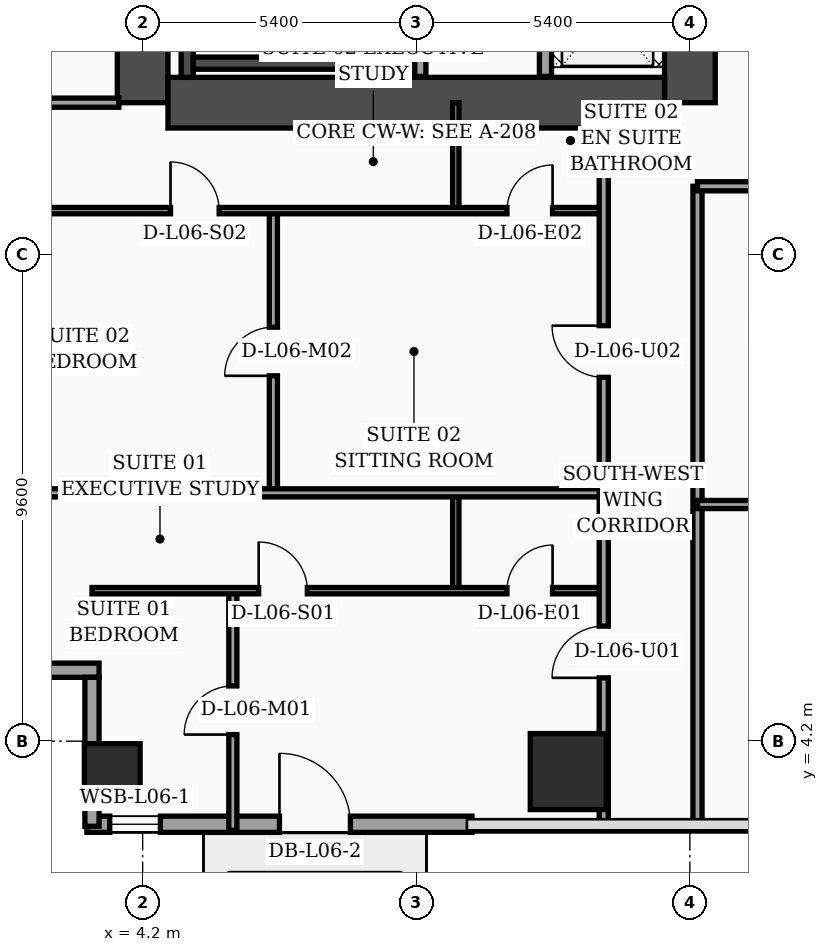
"""IFC4 building model, lengths in metres.
Left out: names, types, materials, properties, quantities, classifications, styles, units other than length and angle.
Written with IfcOpenShell. Run it as: python <this file> out.ifc"""

import sys

from ifc_helpers import new_model, si_unit, direction, frame, frame_2d, origin, origin_2d, place, context, subcontext, project, spatial, rectangle, hollow_rectangle, extrude, element, fill, save


model = new_model("IFC4")
c1 = context("Model", 3, precision=1e-05, world=origin(), true_north=direction((0.0, 1.0)))
c2 = subcontext(c1, "Body", "Model", "MODEL_VIEW")
j1 = project(units=[si_unit("LENGTHUNIT", "METRE"), si_unit("PLANEANGLEUNIT", "RADIAN")], contexts=[c1])
p1 = place(None, origin())
s1 = spatial("IfcSite", under=j1, at=p1, CompositionType="ELEMENT")
p2 = place(p1, origin())
s2 = spatial("IfcBuilding", under=s1, at=p2, CompositionType="ELEMENT")
p3 = place(p2, frame((0.0, 0.0, 30.8)))
s3 = spatial("IfcBuildingStorey", under=s2, at=p3, CompositionType="ELEMENT", Elevation=30.8)
p4 = place(p3, frame((4.2, 16.8, 0.0), z_axis=(0.0, 0.0, 1.0), x_axis=(0.0, 1.0, 0.0)))
e1 = element("IfcWall", 1, at=p4, inside=s3, PredefinedType="SHEAR", context=c2, shape_type="SweptSolid", body=[
    extrude(rectangle(XDim=21.6, YDim=1.0, at=frame_2d((10.8, 0.0))), origin(), (0.0, 0.0, 1.0), 3.56),
])
p5 = place(p3, frame((15.0, 16.8, 0.0), z_axis=(0.0, 0.0, 1.0), x_axis=(0.0, 1.0, 0.0)))
e2 = element("IfcWall", 2, at=p5, inside=s3, PredefinedType="SHEAR", context=c2, shape_type="SweptSolid", body=[
    extrude(rectangle(XDim=21.6, YDim=1.0, at=frame_2d((10.8, 0.0))), origin(), (0.0, 0.0, 1.0), 3.56),
])
p6 = place(p5, frame((8.65, 0.0, 0.0)))
e3 = element("IfcOpeningElement", 3, at=p6, cuts=e2, PredefinedType="OPENING", context=c2, shape_type="SweptSolid", body=[
    extrude(rectangle(XDim=1.1, YDim=2.2, at=frame_2d((0.55, 1.1))), frame((0.0, 0.51, 0.0), z_axis=(0.0, -1.0, 0.0), x_axis=(1.0, 0.0, 0.0)), (0.0, 0.0, 1.0), 1.02),
])
p7 = place(p5, frame((1.25, 0.0, 0.0)))
e4 = element("IfcOpeningElement", 4, at=p7, cuts=e2, PredefinedType="OPENING", context=c2, shape_type="SweptSolid", body=[
    extrude(rectangle(XDim=1.1, YDim=2.2, at=frame_2d((0.55, 1.1))), frame((0.0, 0.51, 0.0), z_axis=(0.0, -1.0, 0.0), x_axis=(1.0, 0.0, 0.0)), (0.0, 0.0, 1.0), 1.02),
])
p8 = place(p5, frame((3.8, 0.0, 0.0)))
e5 = element("IfcOpeningElement", 5, at=p8, cuts=e2, PredefinedType="OPENING", context=c2, shape_type="SweptSolid", body=[
    extrude(rectangle(XDim=1.1, YDim=2.2, at=frame_2d((0.55, 1.1))), frame((0.0, 0.51, 0.0), z_axis=(0.0, -1.0, 0.0), x_axis=(1.0, 0.0, 0.0)), (0.0, 0.0, 1.0), 1.02),
])
p9 = place(p5, frame((6.35, 0.0, 0.0)))
e6 = element("IfcOpeningElement", 6, at=p9, cuts=e2, PredefinedType="OPENING", context=c2, shape_type="SweptSolid", body=[
    extrude(rectangle(XDim=1.1, YDim=2.2, at=frame_2d((0.55, 1.1))), frame((0.0, 0.51, 0.0), z_axis=(0.0, -1.0, 0.0), x_axis=(1.0, 0.0, 0.0)), (0.0, 0.0, 1.0), 1.02),
])
p10 = place(p3, frame((4.7, 16.8, 0.0), z_axis=(0.0, 0.0, 1.0), x_axis=(1.0, 0.0, 0.0)))
e7 = element("IfcWall", 7, at=p10, inside=s3, PredefinedType="SHEAR", context=c2, shape_type="SweptSolid", body=[
    extrude(rectangle(XDim=9.8, YDim=1.0, at=frame_2d((4.9, 0.0))), origin(), (0.0, 0.0, 1.0), 3.56),
])
p11 = place(p3, frame((5.08, 17.3, 0.0), z_axis=(0.0, 0.0, 1.0), x_axis=(0.0, 1.0, 0.0)))
e8 = element("IfcWall", 8, at=p11, inside=s3, PredefinedType="SOLIDWALL", context=c2, shape_type="SweptSolid", body=[
    extrude(rectangle(XDim=9.49, YDim=0.24, at=frame_2d((4.745, 0.0))), origin(), (0.0, 0.0, 1.0), 3.56),
])
p12 = place(p3, frame((8.42, 17.3, 0.0), z_axis=(0.0, 0.0, 1.0), x_axis=(0.0, 1.0, 0.0)))
e9 = element("IfcWall", 9, at=p12, inside=s3, PredefinedType="SOLIDWALL", context=c2, shape_type="SweptSolid", body=[
    extrude(rectangle(XDim=9.49, YDim=0.24, at=frame_2d((4.745, 0.0))), origin(), (0.0, 0.0, 1.0), 3.56),
])
p13 = place(p12, frame((0.35, 0.0, 0.0)))
e10 = element("IfcOpeningElement", 10, at=p13, cuts=e9, PredefinedType="OPENING", context=c2, shape_type="SweptSolid", body=[
    extrude(rectangle(XDim=1.15, YDim=2.2, at=frame_2d((0.575, 1.1))), frame((0.0, 0.13, 0.0), z_axis=(0.0, -1.0, 0.0), x_axis=(1.0, 0.0, 0.0)), (0.0, 0.0, 1.0), 0.26),
])
p14 = place(p3, frame((5.2, 17.58, 0.0), z_axis=(0.0, 0.0, 1.0), x_axis=(1.0, 0.0, 0.0)))
e11 = element("IfcWall", 11, at=p14, inside=s3, PredefinedType="SOLIDWALL", context=c2, shape_type="SweptSolid", body=[
    extrude(rectangle(XDim=3.1, YDim=0.24, at=frame_2d((1.55, 0.0))), origin(), (0.0, 0.0, 1.0), 3.56),
])
p15 = place(p3, frame((3.6, 3.6, 0.0), z_axis=(0.0, 0.0, 1.0), x_axis=(1.0, 0.0, 0.0)))
e12 = element("IfcColumn", 12, at=p15, inside=s3, PredefinedType="COLUMN", context=c2, shape_type="SweptSolid", body=[
    extrude(hollow_rectangle(XDim=1.1, YDim=1.1, WallThickness=0.045, at=origin_2d()), origin(), (0.0, 0.0, 1.0), 3.56),
])
p16 = place(p3, frame((12.6, 3.6, 0.0), z_axis=(0.0, 0.0, 1.0), x_axis=(1.0, 0.0, 0.0)))
e13 = element("IfcColumn", 13, at=p16, inside=s3, PredefinedType="COLUMN", context=c2, shape_type="SweptSolid", body=[
    extrude(rectangle(XDim=1.5, YDim=1.5, at=origin_2d()), origin(), (0.0, 0.0, 1.0), 3.56),
])
p17 = place(p3, frame((3.1, 2.56, 0.0), z_axis=(0.0, 0.0, 1.0), x_axis=(1.0, 0.0, 0.0)))
e14 = element("IfcWall", 14, at=p17, inside=s3, PredefinedType="SOLIDWALL", context=c2, shape_type="SweptSolid", body=[
    extrude(rectangle(XDim=7.6, YDim=0.32, at=frame_2d((3.8, 0.0))), origin(), (0.0, 0.0, 1.0), 3.56),
])
p18 = place(p17, frame((0.45, 0.0, 0.75)))
e15 = element("IfcOpeningElement", 15, at=p18, cuts=e14, PredefinedType="OPENING", context=c2, shape_type="SweptSolid", body=[
    extrude(rectangle(XDim=1.0, YDim=1.6, at=frame_2d((0.5, 0.8))), frame((0.0, 0.17, 0.0), z_axis=(0.0, -1.0, 0.0), x_axis=(1.0, 0.0, 0.0)), (0.0, 0.0, 1.0), 0.34),
])
p19 = place(p17, frame((3.8, 0.0, 0.0)))
e16 = element("IfcOpeningElement", 16, at=p19, cuts=e14, PredefinedType="OPENING", context=c2, shape_type="SweptSolid", body=[
    extrude(rectangle(XDim=1.4, YDim=2.25, at=frame_2d((0.7, 1.125))), frame((0.0, 0.17, 0.0), z_axis=(0.0, -1.0, 0.0), x_axis=(1.0, 0.0, 0.0)), (0.0, 0.0, 1.0), 0.34),
])
p20 = place(p3, frame((0.12, 5.6, 0.0), z_axis=(0.0, 0.0, 1.0), x_axis=(1.0, 0.0, 0.0)))
e17 = element("IfcWall", 17, at=p20, inside=s3, PredefinedType="SOLIDWALL", context=c2, shape_type="SweptSolid", body=[
    extrude(rectangle(XDim=3.22, YDim=0.28, at=frame_2d((1.61, 0.0))), origin(), (0.0, 0.0, 1.0), 2.84),
])
p21 = place(p3, frame((3.2, 5.46, 0.0), z_axis=(0.0, 0.0, 1.0), x_axis=(0.0, -1.0, 0.0)))
e18 = element("IfcWall", 18, at=p21, inside=s3, PredefinedType="SOLIDWALL", context=c2, shape_type="SweptSolid", body=[
    extrude(rectangle(XDim=2.94, YDim=0.28, at=frame_2d((1.47, 0.0))), origin(), (0.0, 0.0, 1.0), 2.84),
])
p22 = place(p3, frame((9.68, 17.32, 0.0), z_axis=(0.0, 0.0, 1.0), x_axis=(0.0, 1.0, 0.0)))
e19 = element("IfcWall", 19, at=p22, inside=s3, PredefinedType="SOLIDWALL", context=c2, shape_type="SweptSolid", body=[
    extrude(rectangle(XDim=7.68, YDim=0.22, at=frame_2d((3.84, 0.0))), origin(), (0.0, 0.0, 1.0), 3.56),
])
p23 = place(p3, frame((12.15, 17.32, 0.0), z_axis=(0.0, 0.0, 1.0), x_axis=(0.0, 1.0, 0.0)))
e20 = element("IfcWall", 20, at=p23, inside=s3, PredefinedType="SOLIDWALL", context=c2, shape_type="SweptSolid", body=[
    extrude(rectangle(XDim=7.65, YDim=0.24, at=frame_2d((3.825, 0.0))), origin(), (0.0, 0.0, 1.0), 3.56),
])
p24 = place(p3, frame((0.08, 16.8, 0.0), z_axis=(0.0, 0.0, 1.0), x_axis=(1.0, 0.0, 0.0)))
e21 = element("IfcWall", 21, at=p24, inside=s3, PredefinedType="PARTITIONING", context=c2, shape_type="SweptSolid", body=[
    extrude(rectangle(XDim=3.65, YDim=0.18, at=frame_2d((1.825, 0.0))), origin(), (0.0, 0.0, 1.0), 2.84),
])
p25 = place(p3, frame((10.38, 7.17, 0.0), z_axis=(0.0, 0.0, 1.0), x_axis=(0.0, 1.0, 0.0)))
e22 = element("IfcWall", 22, at=p25, inside=s3, PredefinedType="PARTITIONING", context=c2, shape_type="SweptSolid", body=[
    extrude(rectangle(XDim=1.93, YDim=0.125, at=frame_2d((0.965, 0.0))), origin(), (0.0, 0.0, 1.0), 3.09),
])
p26 = place(p3, frame((5.98, 2.44, 0.0), z_axis=(0.0, 0.0, 1.0), x_axis=(0.0, 1.0, 0.0)))
e23 = element("IfcWall", 23, at=p26, inside=s3, PredefinedType="PARTITIONING", context=c2, shape_type="SweptSolid", body=[
    extrude(rectangle(XDim=4.73, YDim=0.16, at=frame_2d((2.365, 0.0))), origin(), (0.0, 0.0, 1.0), 3.04),
])
p27 = place(p26, frame((1.89, 0.0, 0.0)))
e24 = element("IfcOpeningElement", 24, at=p27, cuts=e23, PredefinedType="OPENING", context=c2, shape_type="SweptSolid", body=[
    extrude(rectangle(XDim=0.96, YDim=2.2, at=frame_2d((0.48, 1.1))), frame((0.0, 0.09, 0.0), z_axis=(0.0, -1.0, 0.0), x_axis=(1.0, 0.0, 0.0)), (0.0, 0.0, 1.0), 0.18),
])
p28 = place(p3, frame((3.2, 7.17, 0.0), z_axis=(0.0, 0.0, 1.0), x_axis=(1.0, 0.0, 0.0)))
e25 = element("IfcWall", 25, at=p28, inside=s3, PredefinedType="PARTITIONING", context=c2, shape_type="SweptSolid", body=[
    extrude(rectangle(XDim=10.1, YDim=0.125, at=frame_2d((5.05, 0.0))), origin(), (0.0, 0.0, 1.0), 2.84),
])
p29 = place(p28, frame((3.29, 0.0, 0.0)))
e26 = element("IfcOpeningElement", 26, at=p29, cuts=e25, PredefinedType="OPENING", context=c2, shape_type="SweptSolid", body=[
    extrude(rectangle(XDim=0.96, YDim=2.2, at=frame_2d((0.48, 1.1))), frame((0.0, 0.073, 0.0), z_axis=(0.0, -1.0, 0.0), x_axis=(1.0, 0.0, 0.0)), (0.0, 0.0, 1.0), 0.145),
])
p30 = place(p28, frame((8.19, 0.0, 0.0)))
e27 = element("IfcOpeningElement", 27, at=p30, cuts=e25, PredefinedType="OPENING", context=c2, shape_type="SweptSolid", body=[
    extrude(rectangle(XDim=0.9, YDim=2.15, at=frame_2d((0.45, 1.075))), frame((0.0, 0.073, 0.0), z_axis=(0.0, -1.0, 0.0), x_axis=(1.0, 0.0, 0.0)), (0.0, 0.0, 1.0), 0.145),
])
p31 = place(p3, frame((10.38, 14.67, 0.0), z_axis=(0.0, 0.0, 1.0), x_axis=(0.0, 1.0, 0.0)))
e28 = element("IfcWall", 28, at=p31, inside=s3, PredefinedType="PARTITIONING", context=c2, shape_type="SweptSolid", body=[
    extrude(rectangle(XDim=2.13, YDim=0.125, at=frame_2d((1.065, 0.0))), origin(), (0.0, 0.0, 1.0), 3.56),
])
p32 = place(p3, frame((6.78, 9.1, 0.0), z_axis=(0.0, 0.0, 1.0), x_axis=(0.0, 1.0, 0.0)))
e29 = element("IfcWall", 29, at=p32, inside=s3, PredefinedType="PARTITIONING", context=c2, shape_type="SweptSolid", body=[
    extrude(rectangle(XDim=5.57, YDim=0.16, at=frame_2d((2.785, 0.0))), origin(), (0.0, 0.0, 1.0), 3.14),
])
p33 = place(p32, frame((2.31, 0.0, 0.0)))
e30 = element("IfcOpeningElement", 30, at=p33, cuts=e29, PredefinedType="OPENING", context=c2, shape_type="SweptSolid", body=[
    extrude(rectangle(XDim=0.96, YDim=2.2, at=frame_2d((0.48, 1.1))), frame((0.0, 0.09, 0.0), z_axis=(0.0, -1.0, 0.0), x_axis=(1.0, 0.0, 0.0)), (0.0, 0.0, 1.0), 0.18),
])
p34 = place(p3, frame((0.08, 14.67, 0.0), z_axis=(0.0, 0.0, 1.0), x_axis=(1.0, 0.0, 0.0)))
e31 = element("IfcWall", 31, at=p34, inside=s3, PredefinedType="PARTITIONING", context=c2, shape_type="SweptSolid", body=[
    extrude(rectangle(XDim=13.22, YDim=0.125, at=frame_2d((6.61, 0.0))), origin(), (0.0, 0.0, 1.0), 2.84),
])
p35 = place(p34, frame((4.67, 0.0, 0.0)))
e32 = element("IfcOpeningElement", 32, at=p35, cuts=e31, PredefinedType="OPENING", context=c2, shape_type="SweptSolid", body=[
    extrude(rectangle(XDim=0.96, YDim=2.2, at=frame_2d((0.48, 1.1))), frame((0.0, 0.073, 0.0), z_axis=(0.0, -1.0, 0.0), x_axis=(1.0, 0.0, 0.0)), (0.0, 0.0, 1.0), 0.145),
])
p36 = place(p34, frame((11.31, 0.0, 0.0)))
e33 = element("IfcOpeningElement", 33, at=p36, cuts=e31, PredefinedType="OPENING", context=c2, shape_type="SweptSolid", body=[
    extrude(rectangle(XDim=0.9, YDim=2.15, at=frame_2d((0.45, 1.075))), frame((0.0, 0.073, 0.0), z_axis=(0.0, -1.0, 0.0), x_axis=(1.0, 0.0, 0.0)), (0.0, 0.0, 1.0), 0.145),
])
p37 = place(p3, frame((0.08, 9.1, 0.0), z_axis=(0.0, 0.0, 1.0), x_axis=(1.0, 0.0, 0.0)))
e34 = element("IfcWall", 34, at=p37, inside=s3, PredefinedType="PARTITIONING", context=c2, shape_type="SweptSolid", body=[
    extrude(rectangle(XDim=13.22, YDim=0.16, at=frame_2d((6.61, 0.0))), origin(), (0.0, 0.0, 1.0), 2.84),
])
p38 = place(p3, frame((13.3, 2.44, 0.0), z_axis=(0.0, 0.0, 1.0), x_axis=(0.0, 1.0, 0.0)))
e35 = element("IfcWall", 35, at=p38, inside=s3, PredefinedType="PARTITIONING", context=c2, shape_type="SweptSolid", body=[
    extrude(rectangle(XDim=14.36, YDim=0.18, at=frame_2d((7.18, 0.0))), origin(), (0.0, 0.0, 1.0), 3.04),
])
p39 = place(p38, frame((3.01, 0.0, 0.0)))
e36 = element("IfcOpeningElement", 36, at=p39, cuts=e35, PredefinedType="OPENING", context=c2, shape_type="SweptSolid", body=[
    extrude(rectangle(XDim=1.02, YDim=2.2, at=frame_2d((0.51, 1.1))), frame((0.0, 0.1, 0.0), z_axis=(0.0, -1.0, 0.0), x_axis=(1.0, 0.0, 0.0)), (0.0, 0.0, 1.0), 0.2),
])
p40 = place(p38, frame((8.94, 0.0, 0.0)))
e37 = element("IfcOpeningElement", 37, at=p40, cuts=e35, PredefinedType="OPENING", context=c2, shape_type="SweptSolid", body=[
    extrude(rectangle(XDim=1.02, YDim=2.2, at=frame_2d((0.51, 1.1))), frame((0.0, 0.1, 0.0), z_axis=(0.0, -1.0, 0.0), x_axis=(1.0, 0.0, 0.0)), (0.0, 0.0, 1.0), 0.2),
])
p41 = place(p3, frame((15.15, 2.44, 0.0), z_axis=(0.0, 0.0, 1.0), x_axis=(0.0, 1.0, 0.0)))
e38 = element("IfcWall", 38, at=p41, inside=s3, PredefinedType="PARTITIONING", context=c2, shape_type="SweptSolid", body=[
    extrude(rectangle(XDim=12.71, YDim=0.18, at=frame_2d((6.355, 0.0))), origin(), (0.0, 0.0, 1.0), 3.04),
])
p42 = place(p3, frame((15.15, 8.87, 0.0), z_axis=(0.0, 0.0, 1.0), x_axis=(1.0, 0.0, 0.0)))
e39 = element("IfcWall", 39, at=p42, inside=s3, PredefinedType="PARTITIONING", context=c2, shape_type="SweptSolid", body=[
    extrude(rectangle(XDim=4.45, YDim=0.16, at=frame_2d((2.225, 0.0))), origin(), (0.0, 0.0, 1.0), 3.56),
])
p43 = place(p42, frame((1.75, 0.0, 0.0)))
e40 = element("IfcOpeningElement", 40, at=p43, cuts=e39, PredefinedType="OPENING", context=c2, shape_type="SweptSolid", body=[
    extrude(rectangle(XDim=0.96, YDim=2.2, at=frame_2d((0.48, 1.1))), frame((0.0, 0.09, 0.0), z_axis=(0.0, -1.0, 0.0), x_axis=(1.0, 0.0, 0.0)), (0.0, 0.0, 1.0), 0.18),
])
p44 = place(p3, frame((15.15, 15.15, 0.0), z_axis=(0.0, 0.0, 1.0), x_axis=(1.0, 0.0, 0.0)))
e41 = element("IfcWall", 41, at=p44, inside=s3, PredefinedType="PARTITIONING", context=c2, shape_type="SweptSolid", body=[
    extrude(rectangle(XDim=6.45, YDim=0.18, at=frame_2d((3.225, 0.0))), origin(), (0.0, 0.0, 1.0), 2.34),
])
p45 = place(p44, frame((1.74, 0.0, 0.0)))
e42 = element("IfcOpeningElement", 42, at=p45, cuts=e41, PredefinedType="OPENING", context=c2, shape_type="SweptSolid", body=[
    extrude(rectangle(XDim=1.02, YDim=2.2, at=frame_2d((0.51, 1.1))), frame((0.0, 0.1, 0.0), z_axis=(0.0, -1.0, 0.0), x_axis=(1.0, 0.0, 0.0)), (0.0, 0.0, 1.0), 0.2),
])
p46 = place(p18, origin())
e43 = element("IfcWindow", 43, at=p46, inside=s3, PartitioningType="SINGLE_PANEL", PredefinedType="WINDOW", context=c2, shape_type="SweptSolid", body=[
    extrude(rectangle(XDim=1.0, YDim=1.6, at=frame_2d((0.5, 0.8))), frame((0.0, 0.03, 0.0), z_axis=(0.0, -1.0, 0.0), x_axis=(1.0, 0.0, 0.0)), (0.0, 0.0, 1.0), 0.06),
])
fill(e15, e43)
p47 = place(p19, origin())
e44 = element("IfcDoor", 44, at=p47, inside=s3, OperationType="SINGLE_SWING_LEFT", PredefinedType="DOOR", context=c2, shape_type="SweptSolid", body=[
    extrude(rectangle(XDim=1.4, YDim=2.25, at=frame_2d((0.7, 1.125))), frame((0.0, 0.025, 0.0), z_axis=(0.0, -1.0, 0.0), x_axis=(1.0, 0.0, 0.0)), (0.0, 0.0, 1.0), 0.05),
])
fill(e16, e44)
p48 = place(p27, origin())
e45 = element("IfcDoor", 45, at=p48, inside=s3, OperationType="SINGLE_SWING_LEFT", PredefinedType="DOOR", context=c2, shape_type="SweptSolid", body=[
    extrude(rectangle(XDim=0.96, YDim=2.2, at=frame_2d((0.48, 1.1))), frame((0.0, 0.025, 0.0), z_axis=(0.0, -1.0, 0.0), x_axis=(1.0, 0.0, 0.0)), (0.0, 0.0, 1.0), 0.05),
])
fill(e24, e45)
p49 = place(p29, origin())
e46 = element("IfcDoor", 46, at=p49, inside=s3, OperationType="SINGLE_SWING_LEFT", PredefinedType="DOOR", context=c2, shape_type="SweptSolid", body=[
    extrude(rectangle(XDim=0.96, YDim=2.2, at=frame_2d((0.48, 1.1))), frame((0.0, 0.025, 0.0), z_axis=(0.0, -1.0, 0.0), x_axis=(1.0, 0.0, 0.0)), (0.0, 0.0, 1.0), 0.05),
])
fill(e26, e46)
p50 = place(p30, origin())
e47 = element("IfcDoor", 47, at=p50, inside=s3, OperationType="SINGLE_SWING_RIGHT", PredefinedType="DOOR", context=c2, shape_type="SweptSolid", body=[
    extrude(rectangle(XDim=0.9, YDim=2.15, at=frame_2d((0.45, 1.075))), frame((0.0, 0.025, 0.0), z_axis=(0.0, -1.0, 0.0), x_axis=(1.0, 0.0, 0.0)), (0.0, 0.0, 1.0), 0.05),
])
fill(e27, e47)
p51 = place(p33, origin())
e48 = element("IfcDoor", 48, at=p51, inside=s3, OperationType="SINGLE_SWING_LEFT", PredefinedType="DOOR", context=c2, shape_type="SweptSolid", body=[
    extrude(rectangle(XDim=0.96, YDim=2.2, at=frame_2d((0.48, 1.1))), frame((0.0, 0.025, 0.0), z_axis=(0.0, -1.0, 0.0), x_axis=(1.0, 0.0, 0.0)), (0.0, 0.0, 1.0), 0.05),
])
fill(e30, e48)
p52 = place(p35, origin())
e49 = element("IfcDoor", 49, at=p52, inside=s3, OperationType="SINGLE_SWING_LEFT", PredefinedType="DOOR", context=c2, shape_type="SweptSolid", body=[
    extrude(rectangle(XDim=0.96, YDim=2.2, at=frame_2d((0.48, 1.1))), frame((0.0, 0.025, 0.0), z_axis=(0.0, -1.0, 0.0), x_axis=(1.0, 0.0, 0.0)), (0.0, 0.0, 1.0), 0.05),
])
fill(e32, e49)
p53 = place(p36, origin())
e50 = element("IfcDoor", 50, at=p53, inside=s3, OperationType="SINGLE_SWING_RIGHT", PredefinedType="DOOR", context=c2, shape_type="SweptSolid", body=[
    extrude(rectangle(XDim=0.9, YDim=2.15, at=frame_2d((0.45, 1.075))), frame((0.0, 0.025, 0.0), z_axis=(0.0, -1.0, 0.0), x_axis=(1.0, 0.0, 0.0)), (0.0, 0.0, 1.0), 0.05),
])
fill(e33, e50)
p54 = place(p39, origin())
e51 = element("IfcDoor", 51, at=p54, inside=s3, OperationType="SINGLE_SWING_LEFT", PredefinedType="DOOR", context=c2, shape_type="SweptSolid", body=[
    extrude(rectangle(XDim=1.02, YDim=2.2, at=frame_2d((0.51, 1.1))), frame((0.0, 0.025, 0.0), z_axis=(0.0, -1.0, 0.0), x_axis=(1.0, 0.0, 0.0)), (0.0, 0.0, 1.0), 0.05),
])
fill(e36, e51)
p55 = place(p40, origin())
e52 = element("IfcDoor", 52, at=p55, inside=s3, OperationType="SINGLE_SWING_RIGHT", PredefinedType="DOOR", context=c2, shape_type="SweptSolid", body=[
    extrude(rectangle(XDim=1.02, YDim=2.2, at=frame_2d((0.51, 1.1))), frame((0.0, 0.025, 0.0), z_axis=(0.0, -1.0, 0.0), x_axis=(1.0, 0.0, 0.0)), (0.0, 0.0, 1.0), 0.05),
])
fill(e37, e52)
p56 = place(p13, origin())
e53 = element("IfcDoor", 53, at=p56, inside=s3, OperationType="SINGLE_SWING_LEFT", PredefinedType="DOOR", context=c2, shape_type="SweptSolid", body=[
    extrude(rectangle(XDim=1.15, YDim=2.2, at=frame_2d((0.575, 1.1))), frame((0.0, 0.025, 0.0), z_axis=(0.0, -1.0, 0.0), x_axis=(1.0, 0.0, 0.0)), (0.0, 0.0, 1.0), 0.05),
])
fill(e10, e53)
save(model, sys.argv[1])
